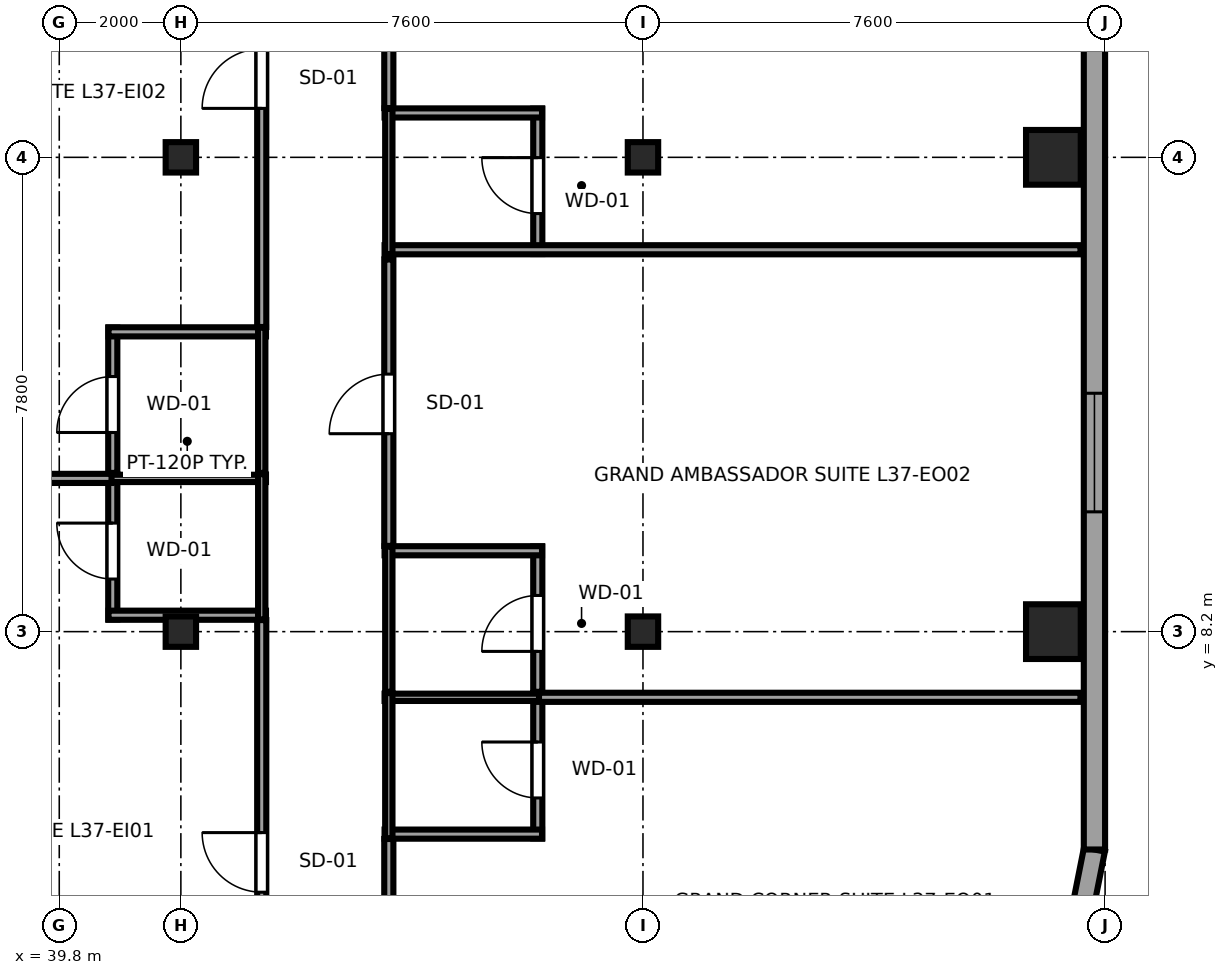
"""IFC4 building model, lengths in metres.
Left out: names, types, materials, properties, quantities, classifications, styles, units other than length and angle.
Written with IfcOpenShell. Run it as: python <this file> out.ifc"""

import sys

from ifc_helpers import new_model, si_unit, direction, frame, frame_2d, origin, origin_2d, place, context, subcontext, project, spatial, rectangle, i_section, extrude, source, transform, mapped, element, fill, save


model = new_model("IFC4")
c1 = context("Model", 3, precision=1e-05, world=origin(), true_north=direction((0.0, 1.0)))
c2 = subcontext(c1, "Body", "Model", "MODEL_VIEW")
j1 = project(units=[si_unit("LENGTHUNIT", "METRE"), si_unit("PLANEANGLEUNIT", "RADIAN")], contexts=[c1])
p1 = place(None, origin())
s1 = spatial("IfcSite", under=j1, at=p1, CompositionType="ELEMENT")
p2 = place(p1, origin())
s2 = spatial("IfcBuilding", under=s1, at=p2, CompositionType="ELEMENT")
p3 = place(p2, frame((0.0, 0.0, 143.5)))
s3 = spatial("IfcBuildingStorey", under=s2, at=p3, CompositionType="ELEMENT", Elevation=143.5)
m1 = source(origin(), c2, "Body", "SweptSolid", [
    extrude(i_section(OverallWidth=0.5, OverallDepth=0.5, WebThickness=0.022, FlangeThickness=0.034, at=origin_2d()), origin(), (0.0, 0.0, 1.0), 3.55),
])
for number, where, z_axis, x_axis in (
    (1, (41.8, 8.2, 0.0), (0.0, 0.0, 1.0), (1.0, 0.0, 0.0)),
    (2, (41.8, 16.0, 0.0), (0.0, 0.0, 1.0), (1.0, 0.0, 0.0)),
    (3, (49.4, 8.2, 0.0), (0.0, 0.0, 1.0), (1.0, 0.0, 0.0)),
    (4, (49.4, 16.0, 0.0), (0.0, 0.0, 1.0), (1.0, 0.0, 0.0)),
):
    element("IfcColumn", number, at=place(p3, frame(where, z_axis=z_axis, x_axis=x_axis)), inside=s3, PredefinedType="COLUMN", context=c2, shape_type="MappedRepresentation", body=[
        mapped(m1, transform((0.0, 0.0, 0.0), x_axis=(1.0, 0.0, 0.0), y_axis=(0.0, 1.0, 0.0), z_axis=(0.0, 0.0, 1.0), scale=1.0)),
    ])
m2 = source(origin(), c2, "Body", "SweptSolid", [
    extrude(rectangle(XDim=0.9, YDim=0.9, at=origin_2d()), origin(), (0.0, 0.0, 1.0), 3.55),
])
for number, where, z_axis, x_axis in (
    (5, (56.15, 8.2, 0.0), (0.0, 0.0, 1.0), (1.0, 0.0, 0.0)),
    (6, (56.15, 16.0, 0.0), (0.0, 0.0, 1.0), (1.0, 0.0, 0.0)),
):
    element("IfcColumn", number, at=place(p3, frame(where, z_axis=z_axis, x_axis=x_axis)), inside=s3, PredefinedType="COLUMN", context=c2, shape_type="MappedRepresentation", body=[
        mapped(m2, transform((0.0, 0.0, 0.0), x_axis=(1.0, 0.0, 0.0), y_axis=(0.0, 1.0, 0.0), z_axis=(0.0, 0.0, 1.0), scale=1.0)),
    ])
p4 = place(p3, frame((56.485, 2.908, 0.0), z_axis=(0.0, 0.0, 1.0), x_axis=(0.195011420161, 0.980800971659, 0.0)))
e7 = element("IfcWall", 7, at=p4, inside=s3, PredefinedType="SOLIDWALL", context=c2, shape_type="SweptSolid", body=[
    extrude(rectangle(XDim=1.743, YDim=0.35, at=frame_2d((0.871, 0.0))), origin(), (0.0, 0.0, 1.0), 2.08),
])
p5 = place(p3, frame((56.825, 4.617, 0.0), z_axis=(0.0, 0.0, 1.0), x_axis=(0.0, 1.0, 0.0)))
e8 = element("IfcWall", 8, at=p5, inside=s3, PredefinedType="SOLIDWALL", context=c2, shape_type="SweptSolid", body=[
    extrude(rectangle(XDim=36.766, YDim=0.35, at=frame_2d((18.383, 0.0))), origin(), (0.0, 0.0, 1.0), 3.29),
])
p6 = place(p5, frame((5.553, 0.0, 0.68)))
e9 = element("IfcOpeningElement", 9, at=p6, cuts=e8, PredefinedType="OPENING", context=c2, shape_type="SweptSolid", body=[
    extrude(rectangle(XDim=1.95, YDim=1.82, at=frame_2d((0.975, 0.91))), frame((0.0, 0.185, 0.0), z_axis=(0.0, -1.0, 0.0), x_axis=(1.0, 0.0, 0.0)), (0.0, 0.0, 1.0), 0.37),
])
p7 = place(p5, frame((13.456, 0.0, 0.68)))
e10 = element("IfcOpeningElement", 10, at=p7, cuts=e8, PredefinedType="OPENING", context=c2, shape_type="SweptSolid", body=[
    extrude(rectangle(XDim=1.95, YDim=1.82, at=frame_2d((0.975, 0.91))), frame((0.0, 0.185, 0.0), z_axis=(0.0, -1.0, 0.0), x_axis=(1.0, 0.0, 0.0)), (0.0, 0.0, 1.0), 0.37),
])
p8 = place(p5, frame((21.36, 0.0, 0.68)))
e11 = element("IfcOpeningElement", 11, at=p8, cuts=e8, PredefinedType="OPENING", context=c2, shape_type="SweptSolid", body=[
    extrude(rectangle(XDim=1.95, YDim=1.82, at=frame_2d((0.975, 0.91))), frame((0.0, 0.185, 0.0), z_axis=(0.0, -1.0, 0.0), x_axis=(1.0, 0.0, 0.0)), (0.0, 0.0, 1.0), 0.37),
])
p9 = place(p5, frame((30.313, 0.0, 0.68)))
e12 = element("IfcOpeningElement", 12, at=p9, cuts=e8, PredefinedType="OPENING", context=c2, shape_type="SweptSolid", body=[
    extrude(rectangle(XDim=1.95, YDim=1.82, at=frame_2d((0.975, 0.91))), frame((0.0, 0.185, 0.0), z_axis=(0.0, -1.0, 0.0), x_axis=(1.0, 0.0, 0.0)), (0.0, 0.0, 1.0), 0.37),
])
p10 = place(p3, frame((40.68, 8.4, 0.0), z_axis=(0.0, 0.0, 1.0), x_axis=(0.0, 1.0, 0.0)))
e13 = element("IfcWall", 13, at=p10, inside=s3, PredefinedType="PARTITIONING", context=c2, shape_type="SweptSolid", body=[
    extrude(rectangle(XDim=2.39, YDim=0.15, at=frame_2d((1.195, 0.0))), origin(), (0.0, 0.0, 1.0), 3.29),
])
p11 = place(p10, frame((0.665, 0.0, 0.0)))
e14 = element("IfcOpeningElement", 14, at=p11, cuts=e13, PredefinedType="OPENING", context=c2, shape_type="SweptSolid", body=[
    extrude(rectangle(XDim=0.92, YDim=2.01, at=frame_2d((0.46, 1.005))), frame((0.0, 0.085, 0.0), z_axis=(0.0, -1.0, 0.0), x_axis=(1.0, 0.0, 0.0)), (0.0, 0.0, 1.0), 0.17),
])
p12 = place(p3, frame((40.61, 8.47, 0.0), z_axis=(0.0, 0.0, 1.0), x_axis=(1.0, 0.0, 0.0)))
e15 = element("IfcWall", 15, at=p12, inside=s3, PredefinedType="PARTITIONING", context=c2, shape_type="SweptSolid", body=[
    extrude(rectangle(XDim=2.59, YDim=0.15, at=frame_2d((1.295, 0.0))), origin(), (0.0, 0.0, 1.0), 2.08),
])
p13 = place(p3, frame((40.61, 10.72, 0.0), z_axis=(0.0, 0.0, 1.0), x_axis=(1.0, 0.0, 0.0)))
e16 = element("IfcWall", 16, at=p13, inside=s3, PredefinedType="PLUMBINGWALL", context=c2, shape_type="SweptSolid", body=[
    extrude(rectangle(XDim=2.59, YDim=0.12, at=frame_2d((1.295, 0.0))), origin(), (0.0, 0.0, 1.0), 3.29),
])
p14 = place(p3, frame((43.13, 8.4, 0.0), z_axis=(0.0, 0.0, 1.0), x_axis=(0.0, 1.0, 0.0)))
e17 = element("IfcWall", 17, at=p14, inside=s3, PredefinedType="PLUMBINGWALL", context=c2, shape_type="SweptSolid", body=[
    extrude(rectangle(XDim=2.39, YDim=0.12, at=frame_2d((1.195, 0.0))), origin(), (0.0, 0.0, 1.0), 3.29),
])
p15 = place(p3, frame((40.68, 10.81, 0.0), z_axis=(0.0, 0.0, 1.0), x_axis=(0.0, 1.0, 0.0)))
e18 = element("IfcWall", 18, at=p15, inside=s3, PredefinedType="PARTITIONING", context=c2, shape_type="SweptSolid", body=[
    extrude(rectangle(XDim=2.39, YDim=0.15, at=frame_2d((1.195, 0.0))), origin(), (0.0, 0.0, 1.0), 3.29),
])
p16 = place(p15, frame((0.665, 0.0, 0.0)))
e19 = element("IfcOpeningElement", 19, at=p16, cuts=e18, PredefinedType="OPENING", context=c2, shape_type="SweptSolid", body=[
    extrude(rectangle(XDim=0.92, YDim=2.01, at=frame_2d((0.46, 1.005))), frame((0.0, 0.085, 0.0), z_axis=(0.0, -1.0, 0.0), x_axis=(1.0, 0.0, 0.0)), (0.0, 0.0, 1.0), 0.17),
])
p17 = place(p3, frame((40.61, 13.13, 0.0), z_axis=(0.0, 0.0, 1.0), x_axis=(1.0, 0.0, 0.0)))
e20 = element("IfcWall", 20, at=p17, inside=s3, PredefinedType="PARTITIONING", context=c2, shape_type="SweptSolid", body=[
    extrude(rectangle(XDim=2.59, YDim=0.15, at=frame_2d((1.295, 0.0))), origin(), (0.0, 0.0, 1.0), 3.29),
])
p18 = place(p3, frame((43.13, 10.81, 0.0), z_axis=(0.0, 0.0, 1.0), x_axis=(0.0, 1.0, 0.0)))
e21 = element("IfcWall", 21, at=p18, inside=s3, PredefinedType="PLUMBINGWALL", context=c2, shape_type="SweptSolid", body=[
    extrude(rectangle(XDim=2.39, YDim=0.12, at=frame_2d((1.195, 0.0))), origin(), (0.0, 0.0, 1.0), 3.29),
])
p19 = place(p3, frame((47.67, 4.8, 0.0), z_axis=(0.0, 0.0, 1.0), x_axis=(0.0, 1.0, 0.0)))
e22 = element("IfcWall", 22, at=p19, inside=s3, PredefinedType="PARTITIONING", context=c2, shape_type="SweptSolid", body=[
    extrude(rectangle(XDim=2.39, YDim=0.15, at=frame_2d((1.195, 0.0))), origin(), (0.0, 0.0, 1.0), 3.29),
])
p20 = place(p19, frame((0.665, 0.0, 0.0)))
e23 = element("IfcOpeningElement", 23, at=p20, cuts=e22, PredefinedType="OPENING", context=c2, shape_type="SweptSolid", body=[
    extrude(rectangle(XDim=0.92, YDim=2.01, at=frame_2d((0.46, 1.005))), frame((0.0, 0.085, 0.0), z_axis=(0.0, -1.0, 0.0), x_axis=(1.0, 0.0, 0.0)), (0.0, 0.0, 1.0), 0.17),
])
p21 = place(p3, frame((45.15, 4.87, 0.0), z_axis=(0.0, 0.0, 1.0), x_axis=(1.0, 0.0, 0.0)))
e24 = element("IfcWall", 24, at=p21, inside=s3, PredefinedType="PARTITIONING", context=c2, shape_type="SweptSolid", body=[
    extrude(rectangle(XDim=2.59, YDim=0.15, at=frame_2d((1.295, 0.0))), origin(), (0.0, 0.0, 1.0), 3.29),
])
p22 = place(p3, frame((45.15, 7.12, 0.0), z_axis=(0.0, 0.0, 1.0), x_axis=(1.0, 0.0, 0.0)))
e25 = element("IfcWall", 25, at=p22, inside=s3, PredefinedType="PLUMBINGWALL", context=c2, shape_type="SweptSolid", body=[
    extrude(rectangle(XDim=2.59, YDim=0.12, at=frame_2d((1.295, 0.0))), origin(), (0.0, 0.0, 1.0), 3.29),
])
p23 = place(p3, frame((45.22, 4.8, 0.0), z_axis=(0.0, 0.0, 1.0), x_axis=(0.0, 1.0, 0.0)))
e26 = element("IfcWall", 26, at=p23, inside=s3, PredefinedType="PLUMBINGWALL", context=c2, shape_type="SweptSolid", body=[
    extrude(rectangle(XDim=2.39, YDim=0.12, at=frame_2d((1.195, 0.0))), origin(), (0.0, 0.0, 1.0), 3.29),
])
p24 = place(p3, frame((47.67, 7.21, 0.0), z_axis=(0.0, 0.0, 1.0), x_axis=(0.0, 1.0, 0.0)))
e27 = element("IfcWall", 27, at=p24, inside=s3, PredefinedType="PARTITIONING", context=c2, shape_type="SweptSolid", body=[
    extrude(rectangle(XDim=2.39, YDim=0.15, at=frame_2d((1.195, 0.0))), origin(), (0.0, 0.0, 1.0), 3.29),
])
p25 = place(p24, frame((0.665, 0.0, 0.0)))
e28 = element("IfcOpeningElement", 28, at=p25, cuts=e27, PredefinedType="OPENING", context=c2, shape_type="SweptSolid", body=[
    extrude(rectangle(XDim=0.92, YDim=2.01, at=frame_2d((0.46, 1.005))), frame((0.0, 0.085, 0.0), z_axis=(0.0, -1.0, 0.0), x_axis=(1.0, 0.0, 0.0)), (0.0, 0.0, 1.0), 0.17),
])
p26 = place(p3, frame((45.15, 9.53, 0.0), z_axis=(0.0, 0.0, 1.0), x_axis=(1.0, 0.0, 0.0)))
e29 = element("IfcWall", 29, at=p26, inside=s3, PredefinedType="PARTITIONING", context=c2, shape_type="SweptSolid", body=[
    extrude(rectangle(XDim=2.59, YDim=0.15, at=frame_2d((1.295, 0.0))), origin(), (0.0, 0.0, 1.0), 3.29),
])
p27 = place(p3, frame((45.22, 7.21, 0.0), z_axis=(0.0, 0.0, 1.0), x_axis=(0.0, 1.0, 0.0)))
e30 = element("IfcWall", 30, at=p27, inside=s3, PredefinedType="PLUMBINGWALL", context=c2, shape_type="SweptSolid", body=[
    extrude(rectangle(XDim=2.39, YDim=0.12, at=frame_2d((1.195, 0.0))), origin(), (0.0, 0.0, 1.0), 3.29),
])
p28 = place(p3, frame((47.67, 14.41, 0.0), z_axis=(0.0, 0.0, 1.0), x_axis=(0.0, 1.0, 0.0)))
e31 = element("IfcWall", 31, at=p28, inside=s3, PredefinedType="PARTITIONING", context=c2, shape_type="SweptSolid", body=[
    extrude(rectangle(XDim=2.39, YDim=0.15, at=frame_2d((1.195, 0.0))), origin(), (0.0, 0.0, 1.0), 3.29),
])
p29 = place(p28, frame((0.665, 0.0, 0.0)))
e32 = element("IfcOpeningElement", 32, at=p29, cuts=e31, PredefinedType="OPENING", context=c2, shape_type="SweptSolid", body=[
    extrude(rectangle(XDim=0.92, YDim=2.01, at=frame_2d((0.46, 1.005))), frame((0.0, 0.085, 0.0), z_axis=(0.0, -1.0, 0.0), x_axis=(1.0, 0.0, 0.0)), (0.0, 0.0, 1.0), 0.17),
])
p30 = place(p3, frame((45.15, 14.48, 0.0), z_axis=(0.0, 0.0, 1.0), x_axis=(1.0, 0.0, 0.0)))
e33 = element("IfcWall", 33, at=p30, inside=s3, PredefinedType="PARTITIONING", context=c2, shape_type="SweptSolid", body=[
    extrude(rectangle(XDim=11.445, YDim=0.15, at=frame_2d((5.723, 0.0))), origin(), (0.0, 0.0, 1.0), 3.29),
])
p31 = place(p3, frame((45.15, 16.73, 0.0), z_axis=(0.0, 0.0, 1.0), x_axis=(1.0, 0.0, 0.0)))
e34 = element("IfcWall", 34, at=p31, inside=s3, PredefinedType="PARTITIONING", context=c2, shape_type="SweptSolid", body=[
    extrude(rectangle(XDim=2.59, YDim=0.15, at=frame_2d((1.295, 0.0))), origin(), (0.0, 0.0, 1.0), 3.29),
])
p32 = place(p3, frame((45.22, 14.41, 0.0), z_axis=(0.0, 0.0, 1.0), x_axis=(0.0, 1.0, 0.0)))
e35 = element("IfcWall", 35, at=p32, inside=s3, PredefinedType="PLUMBINGWALL", context=c2, shape_type="SweptSolid", body=[
    extrude(rectangle(XDim=2.39, YDim=0.12, at=frame_2d((1.195, 0.0))), origin(), (0.0, 0.0, 1.0), 3.29),
])
p33 = place(p3, frame((43.13, 0.405, 0.0), z_axis=(0.0, 0.0, 1.0), x_axis=(0.0, 1.0, 0.0)))
e36 = element("IfcWall", 36, at=p33, inside=s3, PredefinedType="PARTITIONING", context=c2, shape_type="SweptSolid", body=[
    extrude(rectangle(XDim=7.985, YDim=0.15, at=frame_2d((3.992, 0.0))), origin(), (0.0, 0.0, 1.0), 3.29),
])
p34 = place(p33, frame((3.51, 0.0, 0.0)))
e37 = element("IfcOpeningElement", 37, at=p34, cuts=e36, PredefinedType="OPENING", context=c2, shape_type="SweptSolid", body=[
    extrude(rectangle(XDim=0.98, YDim=2.12, at=frame_2d((0.49, 1.06))), frame((0.0, 0.085, 0.0), z_axis=(0.0, -1.0, 0.0), x_axis=(1.0, 0.0, 0.0)), (0.0, 0.0, 1.0), 0.17),
])
p35 = place(p3, frame((34.65, 10.72, 0.0), z_axis=(0.0, 0.0, 1.0), x_axis=(1.0, 0.0, 0.0)))
e38 = element("IfcWall", 38, at=p35, inside=s3, PredefinedType="PARTITIONING", context=c2, shape_type="SweptSolid", body=[
    extrude(rectangle(XDim=6.01, YDim=0.15, at=frame_2d((3.005, 0.0))), origin(), (0.0, 0.0, 1.0), 3.29),
])
p36 = place(p3, frame((43.13, 13.21, 0.0), z_axis=(0.0, 0.0, 1.0), x_axis=(0.0, 1.0, 0.0)))
e39 = element("IfcWall", 39, at=p36, inside=s3, PredefinedType="PARTITIONING", context=c2, shape_type="SweptSolid", body=[
    extrude(rectangle(XDim=8.21, YDim=0.15, at=frame_2d((4.105, 0.0))), origin(), (0.0, 0.0, 1.0), 3.29),
])
p37 = place(p36, frame((3.595, 0.0, 0.0)))
e40 = element("IfcOpeningElement", 40, at=p37, cuts=e39, PredefinedType="OPENING", context=c2, shape_type="SweptSolid", body=[
    extrude(rectangle(XDim=0.98, YDim=2.12, at=frame_2d((0.49, 1.06))), frame((0.0, 0.085, 0.0), z_axis=(0.0, -1.0, 0.0), x_axis=(1.0, 0.0, 0.0)), (0.0, 0.0, 1.0), 0.17),
])
p38 = place(p3, frame((45.22, 0.405, 0.0), z_axis=(0.0, 0.0, 1.0), x_axis=(0.0, 1.0, 0.0)))
e41 = element("IfcWall", 41, at=p38, inside=s3, PredefinedType="PARTITIONING", context=c2, shape_type="SweptSolid", body=[
    extrude(rectangle(XDim=4.385, YDim=0.15, at=frame_2d((2.192, 0.0))), origin(), (0.0, 0.0, 1.0), 3.29),
])
p39 = place(p38, frame((1.71, 0.0, 0.0)))
e42 = element("IfcOpeningElement", 42, at=p39, cuts=e41, PredefinedType="OPENING", context=c2, shape_type="SweptSolid", body=[
    extrude(rectangle(XDim=0.98, YDim=2.12, at=frame_2d((0.49, 1.06))), frame((0.0, 0.085, 0.0), z_axis=(0.0, -1.0, 0.0), x_axis=(1.0, 0.0, 0.0)), (0.0, 0.0, 1.0), 0.17),
])
p40 = place(p3, frame((47.69, 7.12, 0.0), z_axis=(0.0, 0.0, 1.0), x_axis=(1.0, 0.0, 0.0)))
e43 = element("IfcWall", 43, at=p40, inside=s3, PredefinedType="PARTITIONING", context=c2, shape_type="SweptSolid", body=[
    extrude(rectangle(XDim=8.905, YDim=0.15, at=frame_2d((4.453, 0.0))), origin(), (0.0, 0.0, 1.0), 3.29),
])
p41 = place(p3, frame((45.22, 9.61, 0.0), z_axis=(0.0, 0.0, 1.0), x_axis=(0.0, 1.0, 0.0)))
e44 = element("IfcWall", 44, at=p41, inside=s3, PredefinedType="PARTITIONING", context=c2, shape_type="SweptSolid", body=[
    extrude(rectangle(XDim=4.71, YDim=0.15, at=frame_2d((2.355, 0.0))), origin(), (0.0, 0.0, 1.0), 3.29),
])
p42 = place(p41, frame((1.845, 0.0, 0.0)))
e45 = element("IfcOpeningElement", 45, at=p42, cuts=e44, PredefinedType="OPENING", context=c2, shape_type="SweptSolid", body=[
    extrude(rectangle(XDim=0.98, YDim=2.12, at=frame_2d((0.49, 1.06))), frame((0.0, 0.085, 0.0), z_axis=(0.0, -1.0, 0.0), x_axis=(1.0, 0.0, 0.0)), (0.0, 0.0, 1.0), 0.17),
])
p43 = place(p3, frame((45.22, 16.81, 0.0), z_axis=(0.0, 0.0, 1.0), x_axis=(0.0, 1.0, 0.0)))
e46 = element("IfcWall", 46, at=p43, inside=s3, PredefinedType="PARTITIONING", context=c2, shape_type="SweptSolid", body=[
    extrude(rectangle(XDim=4.61, YDim=0.15, at=frame_2d((2.305, 0.0))), origin(), (0.0, 0.0, 1.0), 3.29),
])
p44 = place(p43, frame((1.795, 0.0, 0.0)))
e47 = element("IfcOpeningElement", 47, at=p44, cuts=e46, PredefinedType="OPENING", context=c2, shape_type="SweptSolid", body=[
    extrude(rectangle(XDim=0.98, YDim=2.12, at=frame_2d((0.49, 1.06))), frame((0.0, 0.085, 0.0), z_axis=(0.0, -1.0, 0.0), x_axis=(1.0, 0.0, 0.0)), (0.0, 0.0, 1.0), 0.17),
])
m3 = source(origin(), c2, "Body", "SweptSolid", [
    extrude(rectangle(XDim=1.95, YDim=1.82, at=frame_2d((0.975, 0.91))), frame((0.0, 0.09, 0.0), z_axis=(0.0, -1.0, 0.0), x_axis=(1.0, 0.0, 0.0)), (0.0, 0.0, 1.0), 0.06),
])
p45 = place(p6, origin())
e48 = element("IfcWindow", 48, at=p45, inside=s3, PartitioningType="DOUBLE_PANEL_VERTICAL", PredefinedType="WINDOW", context=c2, shape_type="MappedRepresentation", body=[
    mapped(m3, transform((0.0, 0.0, 0.0), x_axis=(1.0, 0.0, 0.0), y_axis=(0.0, 1.0, 0.0), z_axis=(0.0, 0.0, 1.0), scale=1.0)),
])
fill(e9, e48)
m4 = source(origin(), c2, "Body", "SweptSolid", [
    extrude(rectangle(XDim=0.92, YDim=2.01, at=frame_2d((0.46, 1.005))), frame((0.0, 0.025, 0.0), z_axis=(0.0, -1.0, 0.0), x_axis=(1.0, 0.0, 0.0)), (0.0, 0.0, 1.0), 0.05),
])
p46 = place(p11, origin())
e49 = element("IfcDoor", 49, at=p46, inside=s3, OperationType="SINGLE_SWING_RIGHT", PredefinedType="DOOR", context=c2, shape_type="MappedRepresentation", body=[
    mapped(m4, transform((0.0, 0.0, 0.0), x_axis=(1.0, 0.0, 0.0), y_axis=(0.0, 1.0, 0.0), z_axis=(0.0, 0.0, 1.0), scale=1.0)),
])
fill(e14, e49)
p47 = place(p16, origin())
e50 = element("IfcDoor", 50, at=p47, inside=s3, OperationType="SINGLE_SWING_LEFT", PredefinedType="DOOR", context=c2, shape_type="MappedRepresentation", body=[
    mapped(m4, transform((0.0, 0.0, 0.0), x_axis=(1.0, 0.0, 0.0), y_axis=(0.0, 1.0, 0.0), z_axis=(0.0, 0.0, 1.0), scale=1.0)),
])
fill(e19, e50)
p48 = place(p20, origin())
e51 = element("IfcDoor", 51, at=p48, inside=s3, OperationType="SINGLE_SWING_RIGHT", PredefinedType="DOOR", context=c2, shape_type="MappedRepresentation", body=[
    mapped(m4, transform((0.0, 0.0, 0.0), x_axis=(1.0, 0.0, 0.0), y_axis=(0.0, 1.0, 0.0), z_axis=(0.0, 0.0, 1.0), scale=1.0)),
])
fill(e23, e51)
p49 = place(p25, origin())
e52 = element("IfcDoor", 52, at=p49, inside=s3, OperationType="SINGLE_SWING_LEFT", PredefinedType="DOOR", context=c2, shape_type="MappedRepresentation", body=[
    mapped(m4, transform((0.0, 0.0, 0.0), x_axis=(1.0, 0.0, 0.0), y_axis=(0.0, 1.0, 0.0), z_axis=(0.0, 0.0, 1.0), scale=1.0)),
])
fill(e28, e52)
p50 = place(p29, origin())
e53 = element("IfcDoor", 53, at=p50, inside=s3, OperationType="SINGLE_SWING_RIGHT", PredefinedType="DOOR", context=c2, shape_type="MappedRepresentation", body=[
    mapped(m4, transform((0.0, 0.0, 0.0), x_axis=(1.0, 0.0, 0.0), y_axis=(0.0, 1.0, 0.0), z_axis=(0.0, 0.0, 1.0), scale=1.0)),
])
fill(e32, e53)
m5 = source(origin(), c2, "Body", "SweptSolid", [
    extrude(rectangle(XDim=0.98, YDim=2.12, at=frame_2d((0.49, 1.06))), frame((0.0, 0.025, 0.0), z_axis=(0.0, -1.0, 0.0), x_axis=(1.0, 0.0, 0.0)), (0.0, 0.0, 1.0), 0.05),
])
p51 = place(p34, origin())
e54 = element("IfcDoor", 54, at=p51, inside=s3, OperationType="SINGLE_SWING_RIGHT", PredefinedType="DOOR", context=c2, shape_type="MappedRepresentation", body=[
    mapped(m5, transform((0.0, 0.0, 0.0), x_axis=(1.0, 0.0, 0.0), y_axis=(0.0, 1.0, 0.0), z_axis=(0.0, 0.0, 1.0), scale=1.0)),
])
fill(e37, e54)
p52 = place(p37, origin())
e55 = element("IfcDoor", 55, at=p52, inside=s3, OperationType="SINGLE_SWING_LEFT", PredefinedType="DOOR", context=c2, shape_type="MappedRepresentation", body=[
    mapped(m5, transform((0.0, 0.0, 0.0), x_axis=(1.0, 0.0, 0.0), y_axis=(0.0, 1.0, 0.0), z_axis=(0.0, 0.0, 1.0), scale=1.0)),
])
fill(e40, e55)
p53 = place(p42, origin())
e56 = element("IfcDoor", 56, at=p53, inside=s3, OperationType="SINGLE_SWING_LEFT", PredefinedType="DOOR", context=c2, shape_type="MappedRepresentation", body=[
    mapped(m5, transform((0.0, 0.0, 0.0), x_axis=(1.0, 0.0, 0.0), y_axis=(0.0, 1.0, 0.0), z_axis=(0.0, 0.0, 1.0), scale=1.0)),
])
fill(e45, e56)
save(model, sys.argv[1])
